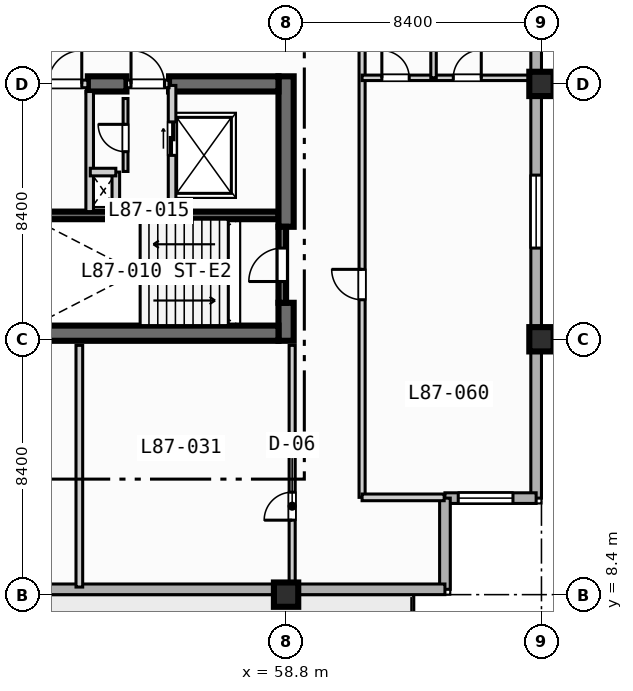
"""IFC4 building model, lengths in metres.
Left out: names, types, materials, properties, quantities, classifications, styles, units other than length and angle.
Written with IfcOpenShell. Run it as: python <this file> out.ifc"""

import sys

from ifc_helpers import new_model, si_unit, direction, frame, frame_2d, origin, origin_2d, place, context, subcontext, project, spatial, rectangle, extrude, element, fill, save


model = new_model("IFC4")
c1 = context("Model", 3, precision=1e-05, world=origin(), true_north=direction((0.0, 1.0)))
c2 = subcontext(c1, "Body", "Model", "MODEL_VIEW")
j1 = project(units=[si_unit("LENGTHUNIT", "METRE"), si_unit("PLANEANGLEUNIT", "RADIAN")], contexts=[c1])
p1 = place(None, origin())
s1 = spatial("IfcSite", under=j1, at=p1, CompositionType="ELEMENT")
p2 = place(p1, origin())
s2 = spatial("IfcBuilding", under=s1, at=p2, CompositionType="ELEMENT")
p3 = place(p2, frame((0.0, 0.0, 351.5)))
s3 = spatial("IfcBuildingStorey", under=s2, at=p3, CompositionType="ELEMENT", Elevation=351.5)
p4 = place(p3, frame((50.5, 20.875, 0.0), z_axis=(0.0, 0.0, 1.0), x_axis=(1.0, 0.0, 0.0)))
e1 = element("IfcWall", 1, at=p4, inside=s3, PredefinedType="SOLIDWALL", context=c2, shape_type="SweptSolid", body=[
    extrude(rectangle(XDim=8.05, YDim=0.25, at=frame_2d((4.025, 0.0))), origin(), (0.0, 0.0, 1.0), 3.67),
])
p5 = place(p3, frame((58.8, 16.75, 0.0), z_axis=(0.0, 0.0, 1.0), x_axis=(0.0, 1.0, 0.0)))
e2 = element("IfcWall", 2, at=p5, inside=s3, PredefinedType="SHEAR", context=c2, shape_type="SweptSolid", body=[
    extrude(rectangle(XDim=1.25, YDim=0.5, at=frame_2d((0.625, 0.0))), origin(), (0.0, 0.0, 1.0), 3.67),
])
p6 = place(p3, frame((58.8, 20.5, 0.0), z_axis=(0.0, 0.0, 1.0), x_axis=(0.0, 1.0, 0.0)))
e3 = element("IfcWall", 3, at=p6, inside=s3, PredefinedType="SHEAR", context=c2, shape_type="SweptSolid", body=[
    extrude(rectangle(XDim=4.95, YDim=0.5, at=frame_2d((2.475, 0.0))), origin(), (0.0, 0.0, 1.0), 3.67),
])
p7 = place(p3, frame((42.2, 17.0, 0.0), z_axis=(0.0, 0.0, 1.0), x_axis=(1.0, 0.0, 0.0)))
e4 = element("IfcWall", 4, at=p7, inside=s3, PredefinedType="SHEAR", context=c2, shape_type="SweptSolid", body=[
    extrude(rectangle(XDim=16.35, YDim=0.5, at=frame_2d((8.175, 0.0))), origin(), (0.0, 0.0, 1.0), 3.67),
])
p8 = place(p3, frame((52.28, 25.2, 0.0), z_axis=(0.0, 0.0, 1.0), x_axis=(1.0, 0.0, 0.0)))
e5 = element("IfcWall", 5, at=p8, inside=s3, PredefinedType="SHEAR", context=c2, shape_type="SweptSolid", body=[
    extrude(rectangle(XDim=1.27, YDim=0.5, at=frame_2d((0.635, 0.0))), origin(), (0.0, 0.0, 1.0), 3.67),
])
p9 = place(p3, frame((54.95, 25.2, 0.0), z_axis=(0.0, 0.0, 1.0), x_axis=(1.0, 0.0, 0.0)))
e6 = element("IfcWall", 6, at=p9, inside=s3, PredefinedType="SHEAR", context=c2, shape_type="SweptSolid", body=[
    extrude(rectangle(XDim=3.6, YDim=0.5, at=frame_2d((1.8, 0.0))), origin(), (0.0, 0.0, 1.0), 3.67),
])
for number, where, z_axis, x_axis in (
    (7, (58.8, 8.4, 0.0), (0.0, 0.0, 1.0), (1.0, 0.0, 0.0)),
    (8, (67.2, 16.8, 0.0), (0.0, 0.0, 1.0), (1.0, 0.0, 0.0)),
    (9, (67.2, 25.2, 0.0), (0.0, 0.0, 1.0), (1.0, 0.0, 0.0)),
):
    element("IfcColumn", number, at=place(p3, frame(where, z_axis=z_axis, x_axis=x_axis)), inside=s3, PredefinedType="COLUMN", context=c2, shape_type="SweptSolid", body=[
        extrude(rectangle(XDim=0.8, YDim=0.8, at=origin_2d()), origin(), (0.0, 0.0, 1.0), 3.9),
    ])
p10 = place(p3, frame((67.025, 30.425, 0.0), z_axis=(0.0, 0.0, 1.0), x_axis=(0.0, -1.0, 0.0)))
e10 = element("IfcWall", 10, at=p10, inside=s3, PredefinedType="STANDARD", context=c2, shape_type="SweptSolid", body=[
    extrude(rectangle(XDim=18.85, YDim=0.35, at=frame_2d((9.425, 0.0))), origin(), (0.0, 0.0, 1.0), 3.67),
])
p11 = place(p10, frame((8.225, 0.0, 0.85)))
e11 = element("IfcOpeningElement", 11, at=p11, cuts=e10, PredefinedType="OPENING", context=c2, shape_type="SweptSolid", body=[
    extrude(rectangle(XDim=2.4, YDim=1.95, at=frame_2d((1.2, 0.975))), frame((0.0, 0.185, 0.0), z_axis=(0.0, -1.0, 0.0), x_axis=(1.0, 0.0, 0.0)), (0.0, 0.0, 1.0), 0.37),
])
p12 = place(p3, frame((67.025, 11.575, 0.0), z_axis=(0.0, 0.0, 1.0), x_axis=(-1.0, 0.0, 0.0)))
e12 = element("IfcWall", 12, at=p12, inside=s3, PredefinedType="STANDARD", context=c2, shape_type="SweptSolid", body=[
    extrude(rectangle(XDim=3.0, YDim=0.35, at=frame_2d((1.5, 0.0))), origin(), (0.0, 0.0, 1.0), 3.67),
])
p13 = place(p12, frame((0.762, 0.0, 0.85)))
e13 = element("IfcOpeningElement", 13, at=p13, cuts=e12, PredefinedType="OPENING", context=c2, shape_type="SweptSolid", body=[
    extrude(rectangle(XDim=1.8, YDim=1.8, at=frame_2d((0.9, 0.9))), frame((0.0, 0.185, 0.0), z_axis=(0.0, -1.0, 0.0), x_axis=(1.0, 0.0, 0.0)), (0.0, 0.0, 1.0), 0.37),
])
p14 = place(p3, frame((64.025, 11.575, 0.0), z_axis=(0.0, 0.0, 1.0), x_axis=(0.0, -1.0, 0.0)))
e14 = element("IfcWall", 14, at=p14, inside=s3, PredefinedType="STANDARD", context=c2, shape_type="SweptSolid", body=[
    extrude(rectangle(XDim=3.0, YDim=0.35, at=frame_2d((1.5, 0.0))), origin(), (0.0, 0.0, 1.0), 3.67),
])
p15 = place(p3, frame((64.025, 8.575, 0.0), z_axis=(0.0, 0.0, 1.0), x_axis=(-1.0, 0.0, 0.0)))
e15 = element("IfcWall", 15, at=p15, inside=s3, PredefinedType="STANDARD", context=c2, shape_type="SweptSolid", body=[
    extrude(rectangle(XDim=52.45, YDim=0.35, at=frame_2d((26.225, 0.0))), origin(), (0.0, 0.0, 1.0), 3.67),
])
p16 = place(p15, frame((33.425, 0.0, 0.0)))
e16 = element("IfcOpeningElement", 16, at=p16, cuts=e15, PredefinedType="OPENING", context=c2, shape_type="SweptSolid", body=[
    extrude(rectangle(XDim=1.4, YDim=2.2, at=frame_2d((0.7, 1.1))), frame((0.0, 0.185, 0.0), z_axis=(0.0, -1.0, 0.0), x_axis=(1.0, 0.0, 0.0)), (0.0, 0.0, 1.0), 0.37),
])
p17 = place(p15, frame((41.825, 0.0, 0.85)))
e17 = element("IfcOpeningElement", 17, at=p17, cuts=e15, PredefinedType="OPENING", context=c2, shape_type="SweptSolid", body=[
    extrude(rectangle(XDim=2.4, YDim=1.95, at=frame_2d((1.2, 0.975))), frame((0.0, 0.185, 0.0), z_axis=(0.0, -1.0, 0.0), x_axis=(1.0, 0.0, 0.0)), (0.0, 0.0, 1.0), 0.37),
])
p18 = place(p15, frame((25.025, 0.0, 0.85)))
e18 = element("IfcOpeningElement", 18, at=p18, cuts=e15, PredefinedType="OPENING", context=c2, shape_type="SweptSolid", body=[
    extrude(rectangle(XDim=2.4, YDim=1.95, at=frame_2d((1.2, 0.975))), frame((0.0, 0.185, 0.0), z_axis=(0.0, -1.0, 0.0), x_axis=(1.0, 0.0, 0.0)), (0.0, 0.0, 1.0), 0.37),
])
p19 = place(p15, frame((16.925, 0.0, 0.85)))
e19 = element("IfcOpeningElement", 19, at=p19, cuts=e15, PredefinedType="OPENING", context=c2, shape_type="SweptSolid", body=[
    extrude(rectangle(XDim=1.8, YDim=1.8, at=frame_2d((0.9, 0.9))), frame((0.0, 0.185, 0.0), z_axis=(0.0, -1.0, 0.0), x_axis=(1.0, 0.0, 0.0)), (0.0, 0.0, 1.0), 0.37),
])
p20 = place(p15, frame((48.575, 0.0, 0.85)))
e20 = element("IfcOpeningElement", 20, at=p20, cuts=e15, PredefinedType="OPENING", context=c2, shape_type="SweptSolid", body=[
    extrude(rectangle(XDim=1.8, YDim=1.8, at=frame_2d((0.9, 0.9))), frame((0.0, 0.185, 0.0), z_axis=(0.0, -1.0, 0.0), x_axis=(1.0, 0.0, 0.0)), (0.0, 0.0, 1.0), 0.37),
])
p21 = place(p15, frame((36.325, 0.0, 0.85)))
e21 = element("IfcOpeningElement", 21, at=p21, cuts=e15, PredefinedType="OPENING", context=c2, shape_type="SweptSolid", body=[
    extrude(rectangle(XDim=1.8, YDim=1.8, at=frame_2d((0.9, 0.9))), frame((0.0, 0.185, 0.0), z_axis=(0.0, -1.0, 0.0), x_axis=(1.0, 0.0, 0.0)), (0.0, 0.0, 1.0), 0.37),
])
p22 = place(p3, frame((58.675, 18.0, 0.0), z_axis=(0.0, 0.0, 1.0), x_axis=(0.0, 1.0, 0.0)))
e22 = element("IfcWall", 22, at=p22, inside=s3, PredefinedType="SOLIDWALL", context=c2, shape_type="SweptSolid", body=[
    extrude(rectangle(XDim=2.5, YDim=0.25, at=frame_2d((1.25, 0.0))), origin(), (0.0, 0.0, 1.0), 3.67),
])
p23 = place(p22, frame((0.7, 0.0, 0.0)))
e23 = element("IfcOpeningElement", 23, at=p23, cuts=e22, PredefinedType="OPENING", context=c2, shape_type="SweptSolid", body=[
    extrude(rectangle(XDim=1.1, YDim=2.15, at=frame_2d((0.55, 1.075))), frame((0.0, 0.135, 0.0), z_axis=(0.0, -1.0, 0.0), x_axis=(1.0, 0.0, 0.0)), (0.0, 0.0, 1.0), 0.27),
])
p24 = place(p3, frame((50.8, 25.2, 0.0), z_axis=(0.0, 0.0, 1.0), x_axis=(1.0, 0.0, 0.0)))
e24 = element("IfcWall", 24, at=p24, inside=s3, PredefinedType="SOLIDWALL", context=c2, shape_type="SweptSolid", body=[
    extrude(rectangle(XDim=1.48, YDim=0.25, at=frame_2d((0.74, 0.0))), origin(), (0.0, 0.0, 1.0), 3.67),
])
p25 = place(p24, frame((0.18, 0.0, 0.0)))
e25 = element("IfcOpeningElement", 25, at=p25, cuts=e24, PredefinedType="OPENING", context=c2, shape_type="SweptSolid", body=[
    extrude(rectangle(XDim=1.1, YDim=2.15, at=frame_2d((0.55, 1.075))), frame((0.0, 0.135, 0.0), z_axis=(0.0, -1.0, 0.0), x_axis=(1.0, 0.0, 0.0)), (0.0, 0.0, 1.0), 0.27),
])
p26 = place(p3, frame((52.34, 21.0, 0.0), z_axis=(0.0, 0.0, 1.0), x_axis=(0.0, 1.0, 0.0)))
e26 = element("IfcWall", 26, at=p26, inside=s3, PredefinedType="SOLIDWALL", context=c2, shape_type="SweptSolid", body=[
    extrude(rectangle(XDim=3.95, YDim=0.25, at=frame_2d((1.975, 0.0))), origin(), (0.0, 0.0, 1.0), 3.67),
])
p27 = place(p3, frame((55.05, 21.0, 0.0), z_axis=(0.0, 0.0, 1.0), x_axis=(0.0, 1.0, 0.0)))
e27 = element("IfcWall", 27, at=p27, inside=s3, PredefinedType="SOLIDWALL", context=c2, shape_type="SweptSolid", body=[
    extrude(rectangle(XDim=4.15, YDim=0.25, at=frame_2d((2.075, 0.0))), origin(), (0.0, 0.0, 1.0), 3.67),
])
p28 = place(p27, frame((1.85, 0.0, 0.0)))
e28 = element("IfcOpeningElement", 28, at=p28, cuts=e27, PredefinedType="OPENING", context=c2, shape_type="SweptSolid", body=[
    extrude(rectangle(XDim=1.1, YDim=2.15, at=frame_2d((0.55, 1.075))), frame((0.0, 0.135, 0.0), z_axis=(0.0, -1.0, 0.0), x_axis=(1.0, 0.0, 0.0)), (0.0, 0.0, 1.0), 0.27),
])
p29 = place(p3, frame((53.55, 25.2, 0.0), z_axis=(0.0, 0.0, 1.0), x_axis=(1.0, 0.0, 0.0)))
e29 = element("IfcWall", 29, at=p29, inside=s3, PredefinedType="SOLIDWALL", context=c2, shape_type="SweptSolid", body=[
    extrude(rectangle(XDim=1.4, YDim=0.25, at=frame_2d((0.7, 0.0))), origin(), (0.0, 0.0, 1.0), 3.67),
])
p30 = place(p29, frame((0.15, 0.0, 0.0)))
e30 = element("IfcOpeningElement", 30, at=p30, cuts=e29, PredefinedType="OPENING", context=c2, shape_type="SweptSolid", body=[
    extrude(rectangle(XDim=1.1, YDim=2.15, at=frame_2d((0.55, 1.075))), frame((0.0, 0.135, 0.0), z_axis=(0.0, -1.0, 0.0), x_axis=(1.0, 0.0, 0.0)), (0.0, 0.0, 1.0), 0.27),
])
p31 = place(p3, frame((53.2, 21.0, 0.0), z_axis=(0.0, 0.0, 1.0), x_axis=(0.0, 1.0, 0.0)))
e31 = element("IfcWall", 31, at=p31, inside=s3, PredefinedType="SOLIDWALL", context=c2, shape_type="SweptSolid", body=[
    extrude(rectangle(XDim=1.3, YDim=0.25, at=frame_2d((0.65, 0.0))), origin(), (0.0, 0.0, 1.0), 3.67),
])
p32 = place(p3, frame((52.36, 22.3, 0.0), z_axis=(0.0, 0.0, 1.0), x_axis=(1.0, 0.0, 0.0)))
e32 = element("IfcWall", 32, at=p32, inside=s3, PredefinedType="SOLIDWALL", context=c2, shape_type="SweptSolid", body=[
    extrude(rectangle(XDim=0.84, YDim=0.25, at=frame_2d((0.42, 0.0))), origin(), (0.0, 0.0, 1.0), 3.67),
])
p33 = place(p3, frame((53.52, 22.32, 0.0), z_axis=(0.0, 0.0, 1.0), x_axis=(0.0, 1.0, 0.0)))
e33 = element("IfcWall", 33, at=p33, inside=s3, PredefinedType="PARTITIONING", context=c2, shape_type="SweptSolid", body=[
    extrude(rectangle(XDim=2.4, YDim=0.16, at=frame_2d((1.2, 0.0))), origin(), (0.0, 0.0, 1.0), 3.67),
])
p34 = place(p33, frame((0.65, 0.0, 0.0)))
e34 = element("IfcOpeningElement", 34, at=p34, cuts=e33, PredefinedType="OPENING", context=c2, shape_type="SweptSolid", body=[
    extrude(rectangle(XDim=0.9, YDim=2.1, at=frame_2d((0.45, 1.05))), frame((0.0, 0.09, 0.0), z_axis=(0.0, -1.0, 0.0), x_axis=(1.0, 0.0, 0.0)), (0.0, 0.0, 1.0), 0.18),
])
p35 = place(p3, frame((59.0, 8.65, 0.0), z_axis=(0.0, 0.0, 1.0), x_axis=(0.0, 1.0, 0.0)))
e35 = element("IfcWall", 35, at=p35, inside=s3, PredefinedType="PARTITIONING", context=c2, shape_type="SweptSolid", body=[
    extrude(rectangle(XDim=7.95, YDim=0.2, at=frame_2d((3.975, 0.0))), origin(), (0.0, 0.0, 1.0), 3.07),
])
p36 = place(p35, frame((2.2, 0.0, 0.0)))
e36 = element("IfcOpeningElement", 36, at=p36, cuts=e35, PredefinedType="OPENING", context=c2, shape_type="SweptSolid", body=[
    extrude(rectangle(XDim=0.92, YDim=2.1, at=frame_2d((0.46, 1.05))), frame((0.0, 0.11, 0.0), z_axis=(0.0, -1.0, 0.0), x_axis=(1.0, 0.0, 0.0)), (0.0, 0.0, 1.0), 0.22),
])
p37 = place(p3, frame((52.0, 8.65, 0.0), z_axis=(0.0, 0.0, 1.0), x_axis=(0.0, 1.0, 0.0)))
e37 = element("IfcWall", 37, at=p37, inside=s3, PredefinedType="PARTITIONING", context=c2, shape_type="SweptSolid", body=[
    extrude(rectangle(XDim=7.95, YDim=0.22, at=frame_2d((3.975, 0.0))), origin(), (0.0, 0.0, 1.0), 3.67),
])
p38 = place(p3, frame((61.3, 11.6, 0.0), z_axis=(0.0, 0.0, 1.0), x_axis=(0.0, 1.0, 0.0)))
e38 = element("IfcWall", 38, at=p38, inside=s3, PredefinedType="PARTITIONING", context=c2, shape_type="SweptSolid", body=[
    extrude(rectangle(XDim=18.8, YDim=0.2, at=frame_2d((9.4, 0.0))), origin(), (0.0, 0.0, 1.0), 3.67),
])
p39 = place(p38, frame((6.5, 0.0, 0.0)))
e39 = element("IfcOpeningElement", 39, at=p39, cuts=e38, PredefinedType="OPENING", context=c2, shape_type="SweptSolid", body=[
    extrude(rectangle(XDim=1.0, YDim=2.15, at=frame_2d((0.5, 1.075))), frame((0.0, 0.11, 0.0), z_axis=(0.0, -1.0, 0.0), x_axis=(1.0, 0.0, 0.0)), (0.0, 0.0, 1.0), 0.22),
])
p40 = place(p3, frame((61.3, 25.4, 0.0), z_axis=(0.0, 0.0, 1.0), x_axis=(1.0, 0.0, 0.0)))
e40 = element("IfcWall", 40, at=p40, inside=s3, PredefinedType="PLUMBINGWALL", context=c2, shape_type="SweptSolid", body=[
    extrude(rectangle(XDim=5.5, YDim=0.18, at=frame_2d((2.75, 0.0))), origin(), (0.0, 0.0, 1.0), 3.127),
])
p41 = place(p40, frame((0.65, 0.0, 0.0)))
e41 = element("IfcOpeningElement", 41, at=p41, cuts=e40, PredefinedType="OPENING", context=c2, shape_type="SweptSolid", body=[
    extrude(rectangle(XDim=0.9, YDim=2.1, at=frame_2d((0.45, 1.05))), frame((0.0, 0.1, 0.0), z_axis=(0.0, -1.0, 0.0), x_axis=(1.0, 0.0, 0.0)), (0.0, 0.0, 1.0), 0.2),
])
p42 = place(p40, frame((3.0, 0.0, 0.0)))
e42 = element("IfcOpeningElement", 42, at=p42, cuts=e40, PredefinedType="OPENING", context=c2, shape_type="SweptSolid", body=[
    extrude(rectangle(XDim=0.92, YDim=2.1, at=frame_2d((0.46, 1.05))), frame((0.0, 0.1, 0.0), z_axis=(0.0, -1.0, 0.0), x_axis=(1.0, 0.0, 0.0)), (0.0, 0.0, 1.0), 0.2),
])
p43 = place(p3, frame((63.65, 25.4, 0.0), z_axis=(0.0, 0.0, 1.0), x_axis=(0.0, 1.0, 0.0)))
e43 = element("IfcWall", 43, at=p43, inside=s3, PredefinedType="PLUMBINGWALL", context=c2, shape_type="SweptSolid", body=[
    extrude(rectangle(XDim=5.0, YDim=0.18, at=frame_2d((2.5, 0.0))), origin(), (0.0, 0.0, 1.0), 3.67),
])
p44 = place(p3, frame((61.3, 11.6, 0.0), z_axis=(0.0, 0.0, 1.0), x_axis=(1.0, 0.0, 0.0)))
e44 = element("IfcWall", 44, at=p44, inside=s3, PredefinedType="PARTITIONING", context=c2, shape_type="SweptSolid", body=[
    extrude(rectangle(XDim=2.7, YDim=0.22, at=frame_2d((1.35, 0.0))), origin(), (0.0, 0.0, 1.0), 3.67),
])
p45 = place(p11, origin())
e45 = element("IfcWindow", 45, at=p45, inside=s3, PartitioningType="SINGLE_PANEL", PredefinedType="WINDOW", context=c2, shape_type="SweptSolid", body=[
    extrude(rectangle(XDim=2.4, YDim=1.95, at=frame_2d((1.2, 0.975))), frame((0.0, 0.03, 0.0), z_axis=(0.0, -1.0, 0.0), x_axis=(1.0, 0.0, 0.0)), (0.0, 0.0, 1.0), 0.06),
])
fill(e11, e45)
p46 = place(p13, origin())
e46 = element("IfcWindow", 46, at=p46, inside=s3, PartitioningType="SINGLE_PANEL", PredefinedType="WINDOW", context=c2, shape_type="SweptSolid", body=[
    extrude(rectangle(XDim=1.8, YDim=1.8, at=frame_2d((0.9, 0.9))), frame((0.0, 0.03, 0.0), z_axis=(0.0, -1.0, 0.0), x_axis=(1.0, 0.0, 0.0)), (0.0, 0.0, 1.0), 0.06),
])
fill(e13, e46)
p47 = place(p23, origin())
e47 = element("IfcDoor", 47, at=p47, inside=s3, OperationType="SINGLE_SWING_LEFT", PredefinedType="DOOR", context=c2, shape_type="SweptSolid", body=[
    extrude(rectangle(XDim=1.1, YDim=2.15, at=frame_2d((0.55, 1.075))), frame((0.0, 0.025, 0.0), z_axis=(0.0, -1.0, 0.0), x_axis=(1.0, 0.0, 0.0)), (0.0, 0.0, 1.0), 0.05),
])
fill(e23, e47)
p48 = place(p25, origin())
e48 = element("IfcDoor", 48, at=p48, inside=s3, OperationType="SINGLE_SWING_RIGHT", PredefinedType="DOOR", context=c2, shape_type="SweptSolid", body=[
    extrude(rectangle(XDim=1.1, YDim=2.15, at=frame_2d((0.55, 1.075))), frame((0.0, 0.025, 0.0), z_axis=(0.0, -1.0, 0.0), x_axis=(1.0, 0.0, 0.0)), (0.0, 0.0, 1.0), 0.05),
])
fill(e25, e48)
p49 = place(p28, origin())
e49 = element("IfcDoor", 49, at=p49, inside=s3, OperationType="SLIDING_TO_LEFT", PredefinedType="DOOR", context=c2, shape_type="SweptSolid", body=[
    extrude(rectangle(XDim=1.1, YDim=2.15, at=frame_2d((0.55, 1.075))), frame((0.0, 0.025, 0.0), z_axis=(0.0, -1.0, 0.0), x_axis=(1.0, 0.0, 0.0)), (0.0, 0.0, 1.0), 0.05),
])
fill(e28, e49)
p50 = place(p30, origin())
e50 = element("IfcDoor", 50, at=p50, inside=s3, OperationType="SINGLE_SWING_LEFT", PredefinedType="DOOR", context=c2, shape_type="SweptSolid", body=[
    extrude(rectangle(XDim=1.1, YDim=2.15, at=frame_2d((0.55, 1.075))), frame((0.0, 0.025, 0.0), z_axis=(0.0, -1.0, 0.0), x_axis=(1.0, 0.0, 0.0)), (0.0, 0.0, 1.0), 0.05),
])
fill(e30, e50)
p51 = place(p34, origin())
e51 = element("IfcDoor", 51, at=p51, inside=s3, OperationType="SINGLE_SWING_RIGHT", PredefinedType="DOOR", context=c2, shape_type="SweptSolid", body=[
    extrude(rectangle(XDim=0.9, YDim=2.1, at=frame_2d((0.45, 1.05))), frame((0.0, 0.025, 0.0), z_axis=(0.0, -1.0, 0.0), x_axis=(1.0, 0.0, 0.0)), (0.0, 0.0, 1.0), 0.05),
])
fill(e34, e51)
p52 = place(p36, origin())
e52 = element("IfcDoor", 52, at=p52, inside=s3, OperationType="SINGLE_SWING_LEFT", PredefinedType="DOOR", context=c2, shape_type="SweptSolid", body=[
    extrude(rectangle(XDim=0.92, YDim=2.1, at=frame_2d((0.46, 1.05))), frame((0.0, 0.025, 0.0), z_axis=(0.0, -1.0, 0.0), x_axis=(1.0, 0.0, 0.0)), (0.0, 0.0, 1.0), 0.05),
])
fill(e36, e52)
p53 = place(p39, origin())
e53 = element("IfcDoor", 53, at=p53, inside=s3, OperationType="SINGLE_SWING_RIGHT", PredefinedType="DOOR", context=c2, shape_type="SweptSolid", body=[
    extrude(rectangle(XDim=1.0, YDim=2.15, at=frame_2d((0.5, 1.075))), frame((0.0, 0.025, 0.0), z_axis=(0.0, -1.0, 0.0), x_axis=(1.0, 0.0, 0.0)), (0.0, 0.0, 1.0), 0.05),
])
fill(e39, e53)
p54 = place(p41, origin())
e54 = element("IfcDoor", 54, at=p54, inside=s3, OperationType="SINGLE_SWING_LEFT", PredefinedType="DOOR", context=c2, shape_type="SweptSolid", body=[
    extrude(rectangle(XDim=0.9, YDim=2.1, at=frame_2d((0.45, 1.05))), frame((0.0, 0.025, 0.0), z_axis=(0.0, -1.0, 0.0), x_axis=(1.0, 0.0, 0.0)), (0.0, 0.0, 1.0), 0.05),
])
fill(e41, e54)
p55 = place(p42, origin())
e55 = element("IfcDoor", 55, at=p55, inside=s3, OperationType="SINGLE_SWING_RIGHT", PredefinedType="DOOR", context=c2, shape_type="SweptSolid", body=[
    extrude(rectangle(XDim=0.92, YDim=2.1, at=frame_2d((0.46, 1.05))), frame((0.0, 0.025, 0.0), z_axis=(0.0, -1.0, 0.0), x_axis=(1.0, 0.0, 0.0)), (0.0, 0.0, 1.0), 0.05),
])
fill(e42, e55)
save(model, sys.argv[1])
